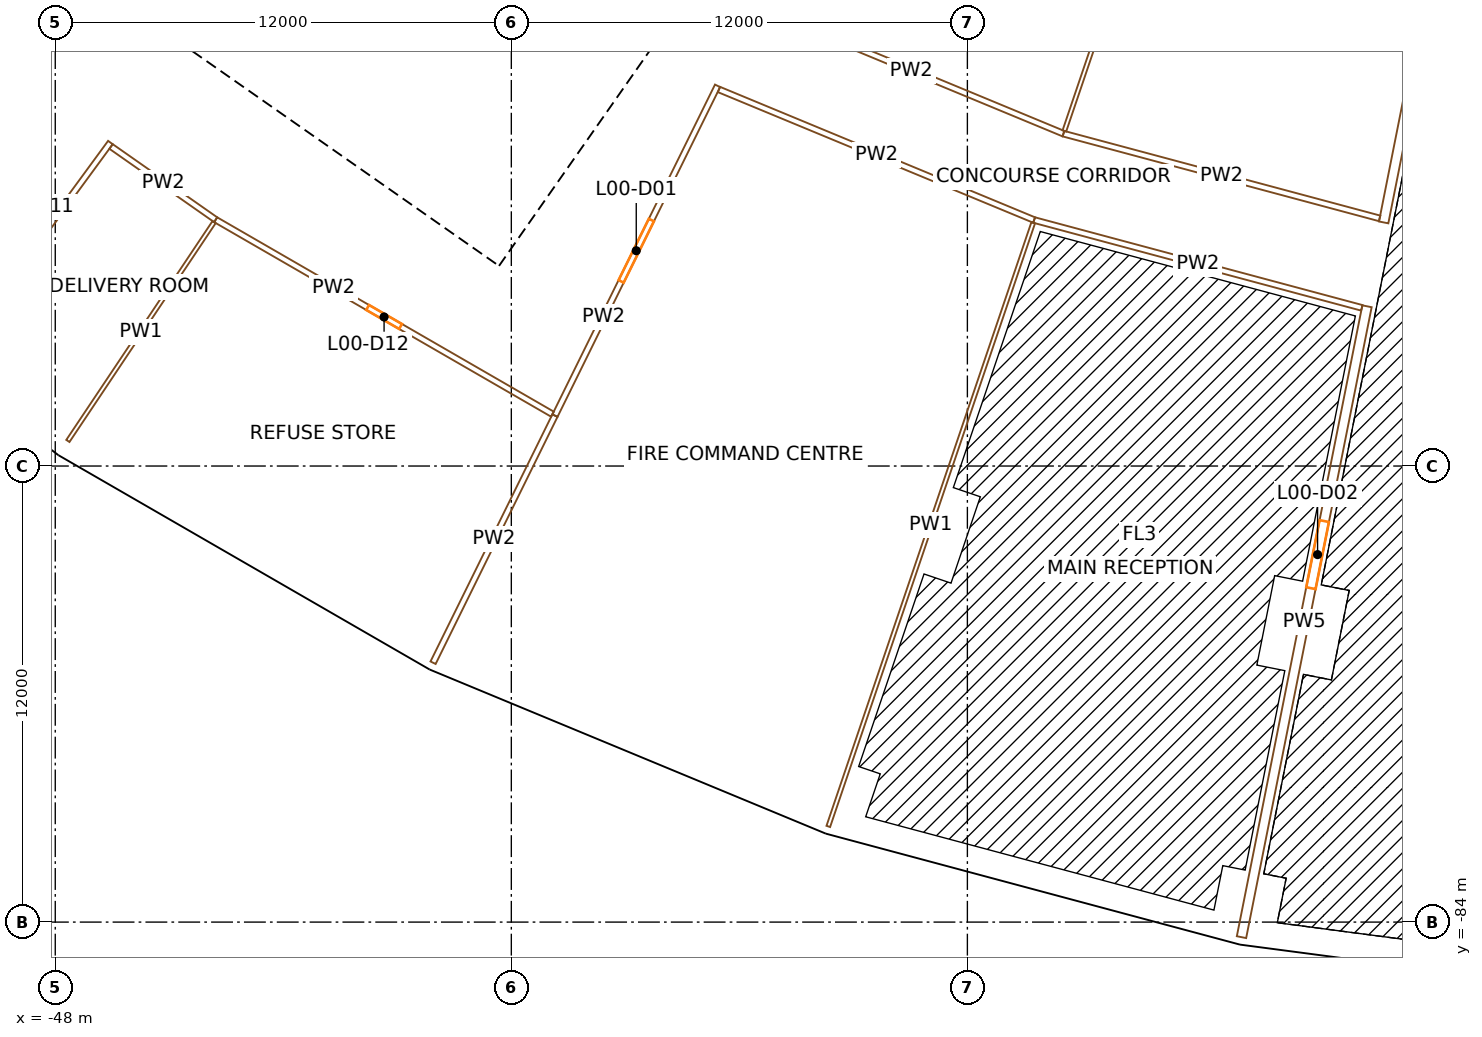
"""IFC4 building model, lengths in metres.
Left out: names, types, materials, properties, quantities, classifications, styles, units other than length and angle.
Written with IfcOpenShell. Run it as: python <this file> out.ifc"""

import sys

from ifc_helpers import new_model, si_unit, direction, frame, frame_2d, origin, origin_2d, place, context, subcontext, project, spatial, rectangle, extrude, element, fill, save


model = new_model("IFC4")
c1 = context("Model", 3, precision=1e-05, world=origin(), true_north=direction((0.0, 1.0)))
c2 = subcontext(c1, "Body", "Model", "MODEL_VIEW")
j1 = project(units=[si_unit("LENGTHUNIT", "METRE"), si_unit("PLANEANGLEUNIT", "RADIAN")], contexts=[c1])
p1 = place(None, origin())
s1 = spatial("IfcSite", under=j1, at=p1, CompositionType="ELEMENT")
p2 = place(p1, origin())
s2 = spatial("IfcBuilding", under=s1, at=p2, CompositionType="ELEMENT")
p3 = place(p2, origin())
s3 = spatial("IfcBuildingStorey", under=s2, at=p3, CompositionType="ELEMENT", Elevation=0.0)
p4 = place(p3, frame((-43.196, -64.647, -0.4), z_axis=(0.0, 0.0, 1.0), x_axis=(0.831469612303, -0.55557023302, 0.0)))
e1 = element("IfcColumn", 1, at=p4, inside=s3, PredefinedType="COLUMN", context=c2, shape_type="SweptSolid", body=[
    extrude(rectangle(XDim=1.4, YDim=1.8, at=origin_2d()), origin(), (0.0, 0.0, 1.0), 9.4),
])
p5 = place(p3, frame((-47.362, -70.883, -0.4), z_axis=(0.0, 0.0, 1.0), x_axis=(0.831469612303, -0.55557023302, 0.0)))
e2 = element("IfcColumn", 2, at=p5, inside=s3, PredefinedType="COLUMN", context=c2, shape_type="SweptSolid", body=[
    extrude(rectangle(XDim=1.1, YDim=1.3, at=origin_2d()), origin(), (0.0, 0.0, 1.0), 9.4),
])
p6 = place(p3, frame((-34.388, -69.732, -0.4), z_axis=(0.0, 0.0, 1.0), x_axis=(0.896872741533, -0.442288690219, 0.0)))
e3 = element("IfcColumn", 3, at=p6, inside=s3, PredefinedType="COLUMN", context=c2, shape_type="SweptSolid", body=[
    extrude(rectangle(XDim=1.4, YDim=1.8, at=origin_2d()), origin(), (0.0, 0.0, 1.0), 9.4),
])
p7 = place(p3, frame((-37.705, -76.458, -0.4), z_axis=(0.0, 0.0, 1.0), x_axis=(0.896872741533, -0.442288690219, 0.0)))
e4 = element("IfcColumn", 4, at=p7, inside=s3, PredefinedType="COLUMN", context=c2, shape_type="SweptSolid", body=[
    extrude(rectangle(XDim=1.1, YDim=1.3, at=origin_2d()), origin(), (0.0, 0.0, 1.0), 9.4),
])
p8 = place(p3, frame((-24.992, -73.624, -0.4), z_axis=(0.0, 0.0, 1.0), x_axis=(0.946930129495, -0.321439465303, 0.0)))
e5 = element("IfcColumn", 5, at=p8, inside=s3, PredefinedType="COLUMN", context=c2, shape_type="SweptSolid", body=[
    extrude(rectangle(XDim=1.4, YDim=1.8, at=origin_2d()), origin(), (0.0, 0.0, 1.0), 9.4),
])
p9 = place(p3, frame((-27.403, -80.726, -0.4), z_axis=(0.0, 0.0, 1.0), x_axis=(0.946930129495, -0.321439465303, 0.0)))
e6 = element("IfcColumn", 6, at=p9, inside=s3, PredefinedType="COLUMN", context=c2, shape_type="SweptSolid", body=[
    extrude(rectangle(XDim=1.1, YDim=1.3, at=origin_2d()), origin(), (0.0, 0.0, 1.0), 9.4),
])
p10 = place(p3, frame((-15.168, -76.256, -0.4), z_axis=(0.0, 0.0, 1.0), x_axis=(0.980785280403, -0.195090322016, 0.0)))
e7 = element("IfcColumn", 7, at=p10, inside=s3, PredefinedType="COLUMN", context=c2, shape_type="SweptSolid", body=[
    extrude(rectangle(XDim=1.4, YDim=1.8, at=origin_2d()), origin(), (0.0, 0.0, 1.0), 9.4),
])
p11 = place(p3, frame((-16.631, -83.612, -0.4), z_axis=(0.0, 0.0, 1.0), x_axis=(0.980785280403, -0.195090322016, 0.0)))
e8 = element("IfcColumn", 8, at=p11, inside=s3, PredefinedType="COLUMN", context=c2, shape_type="SweptSolid", body=[
    extrude(rectangle(XDim=1.1, YDim=1.3, at=origin_2d()), origin(), (0.0, 0.0, 1.0), 9.4),
])
p12 = place(p3, frame((-36.717, -66.337, 0.0), z_axis=(0.0, 0.0, 1.0), x_axis=(0.573577477574, 0.819151315216, 0.0)))
e9 = element("IfcWall", 9, at=p12, inside=s3, PredefinedType="SHEAR", context=c2, shape_type="SweptSolid", body=[
    extrude(rectangle(XDim=14.8, YDim=0.9, at=frame_2d((7.4, 0.0))), origin(), (0.0, 0.0, 1.0), 8.6),
])
p13 = place(p12, frame((6.2, 0.0, 0.0)))
e10 = element("IfcOpeningElement", 10, at=p13, cuts=e9, PredefinedType="OPENING", context=c2, shape_type="SweptSolid", body=[
    extrude(rectangle(XDim=2.4, YDim=2.1, at=frame_2d((1.2, 1.05))), frame((0.0, 0.46, 0.0), z_axis=(0.0, -1.0, 0.0), x_axis=(1.0, 0.0, 0.0)), (0.0, 0.0, 1.0), 0.92),
])
p14 = place(p3, frame((-36.827, -65.71, 0.0), z_axis=(0.0, 0.0, 1.0), x_axis=(-0.819153391756, 0.573574511963, 0.0)))
e11 = element("IfcWall", 11, at=p14, inside=s3, PredefinedType="SHEAR", context=c2, shape_type="SweptSolid", body=[
    extrude(rectangle(XDim=15.045, YDim=0.9, at=frame_2d((7.523, 0.0))), origin(), (0.0, 0.0, 1.0), 8.6),
])
p15 = place(p14, frame((0.8, 0.0, 0.0)))
e12 = element("IfcOpeningElement", 12, at=p15, cuts=e11, PredefinedType="OPENING", context=c2, shape_type="SweptSolid", body=[
    extrude(rectangle(XDim=1.0, YDim=2.1, at=frame_2d((0.5, 1.05))), frame((0.0, 0.46, 0.0), z_axis=(0.0, -1.0, 0.0), x_axis=(1.0, 0.0, 0.0)), (0.0, 0.0, 1.0), 0.92),
])
p16 = place(p14, frame((3.475, 0.0, 0.0)))
e13 = element("IfcOpeningElement", 13, at=p16, cuts=e11, PredefinedType="OPENING", context=c2, shape_type="SweptSolid", body=[
    extrude(rectangle(XDim=1.0, YDim=2.1, at=frame_2d((0.5, 1.05))), frame((0.0, 0.46, 0.0), z_axis=(0.0, -1.0, 0.0), x_axis=(1.0, 0.0, 0.0)), (0.0, 0.0, 1.0), 0.92),
])
p17 = place(p14, frame((6.175, 0.0, 0.0)))
e14 = element("IfcOpeningElement", 14, at=p17, cuts=e11, PredefinedType="OPENING", context=c2, shape_type="SweptSolid", body=[
    extrude(rectangle(XDim=1.0, YDim=2.1, at=frame_2d((0.5, 1.05))), frame((0.0, 0.46, 0.0), z_axis=(0.0, -1.0, 0.0), x_axis=(1.0, 0.0, 0.0)), (0.0, 0.0, 1.0), 0.92),
])
p18 = place(p14, frame((13.495, 0.0, 0.0)))
e15 = element("IfcOpeningElement", 15, at=p18, cuts=e11, PredefinedType="OPENING", context=c2, shape_type="SweptSolid", body=[
    extrude(rectangle(XDim=1.1, YDim=2.1, at=frame_2d((0.55, 1.05))), frame((0.0, 0.46, 0.0), z_axis=(0.0, -1.0, 0.0), x_axis=(1.0, 0.0, 0.0)), (0.0, 0.0, 1.0), 0.92),
])
p19 = place(p3, frame((-33.787, -61.369, 0.0), z_axis=(0.0, 0.0, 1.0), x_axis=(-0.819152564888, 0.573575692858, 0.0)))
e16 = element("IfcWall", 16, at=p19, inside=s3, PredefinedType="SOLIDWALL", context=c2, shape_type="SweptSolid", body=[
    extrude(rectangle(XDim=7.95, YDim=0.3, at=frame_2d((3.975, 0.0))), origin(), (0.0, 0.0, 1.0), 8.6),
])
p20 = place(p19, frame((0.962, 0.0, 0.0)))
e17 = element("IfcOpeningElement", 17, at=p20, cuts=e16, PredefinedType="OPENING", context=c2, shape_type="SweptSolid", body=[
    extrude(rectangle(XDim=1.0, YDim=2.1, at=frame_2d((0.5, 1.05))), frame((0.0, 0.16, 0.0), z_axis=(0.0, -1.0, 0.0), x_axis=(1.0, 0.0, 0.0)), (0.0, 0.0, 1.0), 0.32),
])
p21 = place(p19, frame((3.775, 0.0, 0.0)))
e18 = element("IfcOpeningElement", 18, at=p21, cuts=e16, PredefinedType="OPENING", context=c2, shape_type="SweptSolid", body=[
    extrude(rectangle(XDim=1.0, YDim=2.1, at=frame_2d((0.5, 1.05))), frame((0.0, 0.16, 0.0), z_axis=(0.0, -1.0, 0.0), x_axis=(1.0, 0.0, 0.0)), (0.0, 0.0, 1.0), 0.32),
])
p22 = place(p19, frame((6.288, 0.0, 0.0)))
e19 = element("IfcOpeningElement", 19, at=p22, cuts=e16, PredefinedType="OPENING", context=c2, shape_type="SweptSolid", body=[
    extrude(rectangle(XDim=1.0, YDim=2.1, at=frame_2d((0.5, 1.05))), frame((0.0, 0.16, 0.0), z_axis=(0.0, -1.0, 0.0), x_axis=(1.0, 0.0, 0.0)), (0.0, 0.0, 1.0), 0.32),
])
p23 = place(p3, frame((-35.221, -63.417, 0.0), z_axis=(0.0, 0.0, 1.0), x_axis=(-0.819166993208, 0.573555086491, 0.0)))
e20 = element("IfcWall", 20, at=p23, inside=s3, PredefinedType="SOLIDWALL", context=c2, shape_type="SweptSolid", body=[
    extrude(rectangle(XDim=7.95, YDim=0.3, at=frame_2d((3.975, 0.0))), origin(), (0.0, 0.0, 1.0), 8.6),
])
p24 = place(p3, frame((-36.331, -59.771, 0.0), z_axis=(0.0, 0.0, 1.0), x_axis=(-0.573633636671, -0.819111989218, 0.0)))
e21 = element("IfcWall", 21, at=p24, inside=s3, PredefinedType="PARTITIONING", context=c2, shape_type="SweptSolid", body=[
    extrude(rectangle(XDim=2.2, YDim=0.15, at=frame_2d((1.1, 0.0))), origin(), (0.0, 0.0, 1.0), 8.6),
])
p25 = place(p3, frame((-37.478, -62.02, 0.0), z_axis=(0.0, 0.0, 1.0), x_axis=(-0.573581496053, -0.819148501424, 0.0)))
e22 = element("IfcWall", 22, at=p25, inside=s3, PredefinedType="PLUMBINGWALL", context=c2, shape_type="SweptSolid", body=[
    extrude(rectangle(XDim=2.2, YDim=0.1, at=frame_2d((1.1, 0.0))), origin(), (0.0, 0.0, 1.0), 8.6),
])
p26 = place(p3, frame((-39.649, -60.5, 0.0), z_axis=(0.0, 0.0, 1.0), x_axis=(-0.573507030513, -0.819200638399, 0.0)))
e23 = element("IfcWall", 23, at=p26, inside=s3, PredefinedType="PLUMBINGWALL", context=c2, shape_type="SweptSolid", body=[
    extrude(rectangle(XDim=2.2, YDim=0.1, at=frame_2d((1.1, 0.0))), origin(), (0.0, 0.0, 1.0), 8.6),
])
p27 = place(p3, frame((-56.673, -64.713, 0.0), z_axis=(0.0, 0.0, 1.0), x_axis=(0.793355377778, -0.608758773695, 0.0)))
e24 = element("IfcWall", 24, at=p27, inside=s3, PredefinedType="SOLIDWALL", context=c2, shape_type="SweptSolid", body=[
    extrude(rectangle(XDim=11.135, YDim=0.45, at=frame_2d((5.567, 0.0))), origin(), (0.0, 0.0, 1.0), 7.7),
])
p28 = place(p27, frame((3.396, 0.0, 0.0), z_axis=(0.0, 0.0, 1.0), x_axis=(-1.0, 0.0, 0.0)))
e25 = element("IfcOpeningElement", 25, at=p28, cuts=e24, PredefinedType="OPENING", context=c2, shape_type="SweptSolid", body=[
    extrude(rectangle(XDim=1.2, YDim=2.4, at=frame_2d((0.6, 1.2))), frame((0.0, 0.235, 0.0), z_axis=(0.0, -1.0, 0.0), x_axis=(1.0, 0.0, 0.0)), (0.0, 0.0, 1.0), 0.47),
])
p29 = place(p3, frame((-47.819, -71.512, 0.0), z_axis=(0.0, 0.0, 1.0), x_axis=(0.866022921069, -0.500004300164, 0.0)))
e26 = element("IfcWall", 26, at=p29, inside=s3, PredefinedType="SOLIDWALL", context=c2, shape_type="SweptSolid", body=[
    extrude(rectangle(XDim=11.297, YDim=0.45, at=frame_2d((5.649, 0.0))), origin(), (0.0, 0.0, 1.0), 7.7),
])
p30 = place(p29, frame((4.756, 0.0, 0.0)))
e27 = element("IfcOpeningElement", 27, at=p30, cuts=e26, PredefinedType="OPENING", context=c2, shape_type="SweptSolid", body=[
    extrude(rectangle(XDim=1.8, YDim=2.4, at=frame_2d((0.9, 1.2))), frame((0.0, 0.235, 0.0), z_axis=(0.0, -1.0, 0.0), x_axis=(1.0, 0.0, 0.0)), (0.0, 0.0, 1.0), 0.47),
])
p31 = place(p3, frame((-13.078, -84.935, 0.0), z_axis=(0.0, 0.0, 1.0), x_axis=(0.99144147491, -0.130551912392, 0.0)))
e28 = element("IfcWall", 28, at=p31, inside=s3, PredefinedType="SOLIDWALL", context=c2, shape_type="SweptSolid", body=[
    extrude(rectangle(XDim=3.761, YDim=0.3, at=frame_2d((1.88, 0.0))), origin(), (0.0, 0.0, 1.0), 7.7),
])
p32 = place(p31, frame((0.68, 0.0, 0.0)))
e29 = element("IfcOpeningElement", 29, at=p32, cuts=e28, PredefinedType="OPENING", context=c2, shape_type="SweptSolid", body=[
    extrude(rectangle(XDim=2.4, YDim=3.0, at=frame_2d((1.2, 1.5))), frame((0.0, 0.16, 0.0), z_axis=(0.0, -1.0, 0.0), x_axis=(1.0, 0.0, 0.0)), (0.0, 0.0, 1.0), 0.32),
])
p33 = place(p3, frame((-46.549, -63.489, 0.0), z_axis=(0.0, 0.0, 1.0), x_axis=(-0.591288618584, -0.806460023518, 0.0)))
e30 = element("IfcWall", 30, at=p33, inside=s3, PredefinedType="PARTITIONING", context=c2, shape_type="SweptSolid", body=[
    extrude(rectangle(XDim=6.911, YDim=0.15, at=frame_2d((3.456, 0.0))), origin(), (0.0, 0.0, 1.0), 7.6),
])
p34 = place(p33, frame((3.005, 0.0, 0.0)))
e31 = element("IfcOpeningElement", 31, at=p34, cuts=e30, PredefinedType="OPENING", context=c2, shape_type="SweptSolid", body=[
    extrude(rectangle(XDim=0.9, YDim=2.1, at=frame_2d((0.45, 1.05))), frame((0.0, 0.085, 0.0), z_axis=(0.0, -1.0, 0.0), x_axis=(1.0, 0.0, 0.0)), (0.0, 0.0, 1.0), 0.17),
])
p35 = place(p3, frame((-47.668, -71.34, 0.0), z_axis=(0.0, 0.0, 1.0), x_axis=(0.55558668503, 0.831458619185, 0.0)))
e32 = element("IfcWall", 32, at=p35, inside=s3, PredefinedType="PARTITIONING", context=c2, shape_type="SweptSolid", body=[
    extrude(rectangle(XDim=6.925, YDim=0.1, at=frame_2d((3.462, 0.0))), origin(), (0.0, 0.0, 1.0), 7.6),
])
p36 = place(p3, frame((-46.532, -63.592, 0.0), z_axis=(0.0, 0.0, 1.0), x_axis=(0.819136350291, -0.573598849051, 0.0)))
e33 = element("IfcWall", 33, at=p36, inside=s3, PredefinedType="PARTITIONING", context=c2, shape_type="SweptSolid", body=[
    extrude(rectangle(XDim=3.361, YDim=0.15, at=frame_2d((1.68, 0.0))), origin(), (0.0, 0.0, 1.0), 7.6),
])
p37 = place(p3, frame((-34.917, -70.636, 0.0), z_axis=(0.0, 0.0, 1.0), x_axis=(-0.866032223049, 0.499988188501, 0.0)))
e34 = element("IfcWall", 34, at=p37, inside=s3, PredefinedType="PARTITIONING", context=c2, shape_type="SweptSolid", body=[
    extrude(rectangle(XDim=10.233, YDim=0.15, at=frame_2d((5.116, 0.0))), origin(), (0.0, 0.0, 1.0), 7.6),
])
p38 = place(p37, frame((4.616, 0.0, 0.0)))
e35 = element("IfcOpeningElement", 35, at=p38, cuts=e34, PredefinedType="OPENING", context=c2, shape_type="SweptSolid", body=[
    extrude(rectangle(XDim=1.0, YDim=2.1, at=frame_2d((0.5, 1.05))), frame((0.0, 0.085, 0.0), z_axis=(0.0, -1.0, 0.0), x_axis=(1.0, 0.0, 0.0)), (0.0, 0.0, 1.0), 0.17),
])
p39 = place(p3, frame((-34.852, -70.674, 0.0), z_axis=(0.0, 0.0, 1.0), x_axis=(-0.442303616305, -0.896865380647, 0.0)))
e36 = element("IfcWall", 36, at=p39, inside=s3, PredefinedType="PARTITIONING", context=c2, shape_type="SweptSolid", body=[
    extrude(rectangle(XDim=7.25, YDim=0.15, at=frame_2d((3.625, 0.0))), origin(), (0.0, 0.0, 1.0), 7.6),
])
p40 = place(p3, frame((-30.573, -61.996, 0.0), z_axis=(0.0, 0.0, 1.0), x_axis=(-0.442281083907, -0.89687649251, 0.0)))
e37 = element("IfcWall", 37, at=p40, inside=s3, PredefinedType="PARTITIONING", context=c2, shape_type="SweptSolid", body=[
    extrude(rectangle(XDim=9.675, YDim=0.15, at=frame_2d((4.837, 0.0))), origin(), (0.0, 0.0, 1.0), 7.6),
])
p41 = place(p40, frame((3.938, 0.0, 0.0)))
e38 = element("IfcOpeningElement", 38, at=p41, cuts=e37, PredefinedType="OPENING", context=c2, shape_type="SweptSolid", body=[
    extrude(rectangle(XDim=1.8, YDim=2.1, at=frame_2d((0.9, 1.05))), frame((0.0, 0.085, 0.0), z_axis=(0.0, -1.0, 0.0), x_axis=(1.0, 0.0, 0.0)), (0.0, 0.0, 1.0), 0.17),
])
p42 = place(p3, frame((-30.537, -62.092, 0.0), z_axis=(0.0, 0.0, 1.0), x_axis=(0.923877943186, -0.382687269313, 0.0)))
e39 = element("IfcWall", 39, at=p42, inside=s3, PredefinedType="PARTITIONING", context=c2, shape_type="SweptSolid", body=[
    extrude(rectangle(XDim=8.977, YDim=0.15, at=frame_2d((4.488, 0.0))), origin(), (0.0, 0.0, 1.0), 7.6),
])
p43 = place(p3, frame((-29.476, -59.94, 0.0), z_axis=(0.0, 0.0, 1.0), x_axis=(0.923877031545, -0.382689470177, 0.0)))
e40 = element("IfcWall", 40, at=p43, inside=s3, PredefinedType="PARTITIONING", context=c2, shape_type="SweptSolid", body=[
    extrude(rectangle(XDim=8.663, YDim=0.15, at=frame_2d((4.332, 0.0))), origin(), (0.0, 0.0, 1.0), 7.6),
])
p44 = place(p3, frame((-27.66, -81.483, 0.0), z_axis=(0.0, 0.0, 1.0), x_axis=(0.321431987478, 0.946932667842, 0.0)))
e41 = element("IfcWall", 41, at=p44, inside=s3, PredefinedType="PARTITIONING", context=c2, shape_type="SweptSolid", body=[
    extrude(rectangle(XDim=16.774, YDim=0.1, at=frame_2d((8.387, 0.0))), origin(), (0.0, 0.0, 1.0), 7.6),
])
p45 = place(p3, frame((-22.244, -65.528, 0.0), z_axis=(0.0, 0.0, 1.0), x_axis=(0.965928763412, -0.258808083362, 0.0)))
e42 = element("IfcWall", 42, at=p45, inside=s3, PredefinedType="PARTITIONING", context=c2, shape_type="SweptSolid", body=[
    extrude(rectangle(XDim=8.927, YDim=0.15, at=frame_2d((4.463, 0.0))), origin(), (0.0, 0.0, 1.0), 7.6),
])
p46 = place(p3, frame((-21.472, -63.255, 0.0), z_axis=(0.0, 0.0, 1.0), x_axis=(0.96592325157, -0.258828653894, 0.0)))
e43 = element("IfcWall", 43, at=p46, inside=s3, PredefinedType="PARTITIONING", context=c2, shape_type="SweptSolid", body=[
    extrude(rectangle(XDim=8.613, YDim=0.15, at=frame_2d((4.306, 0.0))), origin(), (0.0, 0.0, 1.0), 7.6),
])
p47 = place(p3, frame((-16.136, -47.536, 0.0), z_axis=(0.0, 0.0, 1.0), x_axis=(-0.321439713462, -0.946930045256, 0.0)))
e44 = element("IfcWall", 44, at=p47, inside=s3, PredefinedType="PARTITIONING", context=c2, shape_type="SweptSolid", body=[
    extrude(rectangle(XDim=16.525, YDim=0.1, at=frame_2d((8.262, 0.0))), origin(), (0.0, 0.0, 1.0), 7.6),
])
p48 = place(p3, frame((-16.787, -84.396, 0.0), z_axis=(0.0, 0.0, 1.0), x_axis=(0.195086842272, 0.980785972561, 0.0)))
e45 = element("IfcWall", 45, at=p48, inside=s3, PredefinedType="PARTITIONING", context=c2, shape_type="SweptSolid", body=[
    extrude(rectangle(XDim=16.925, YDim=0.25, at=frame_2d((8.462, 0.0))), origin(), (0.0, 0.0, 1.0), 7.6),
])
p49 = place(p48, frame((9.362, 0.0, 0.0)))
e46 = element("IfcOpeningElement", 46, at=p49, cuts=e45, PredefinedType="OPENING", context=c2, shape_type="SweptSolid", body=[
    extrude(rectangle(XDim=1.8, YDim=2.1, at=frame_2d((0.9, 1.05))), frame((0.0, 0.135, 0.0), z_axis=(0.0, -1.0, 0.0), x_axis=(1.0, 0.0, 0.0)), (0.0, 0.0, 1.0), 0.27),
])
p50 = place(p3, frame((-13.047, -65.59, 0.0), z_axis=(0.0, 0.0, 1.0), x_axis=(0.195085176221, 0.980786303952, 0.0)))
e47 = element("IfcWall", 47, at=p50, inside=s3, PredefinedType="PARTITIONING", context=c2, shape_type="SweptSolid", body=[
    extrude(rectangle(XDim=17.125, YDim=0.25, at=frame_2d((8.562, 0.0))), origin(), (0.0, 0.0, 1.0), 7.6),
])
p51 = place(p50, frame((6.262, 0.0, 0.0)))
e48 = element("IfcOpeningElement", 48, at=p51, cuts=e47, PredefinedType="OPENING", context=c2, shape_type="SweptSolid", body=[
    extrude(rectangle(XDim=1.0, YDim=2.1, at=frame_2d((0.5, 1.05))), frame((0.0, 0.135, 0.0), z_axis=(0.0, -1.0, 0.0), x_axis=(1.0, 0.0, 0.0)), (0.0, 0.0, 1.0), 0.27),
])
p52 = place(p13, origin())
e49 = element("IfcDoor", 49, at=p52, inside=s3, OperationType="DOUBLE_DOOR_SINGLE_SWING", PredefinedType="DOOR", context=c2, shape_type="SweptSolid", body=[
    extrude(rectangle(XDim=2.4, YDim=2.1, at=frame_2d((1.2, 1.05))), frame((0.0, 0.025, 0.0), z_axis=(0.0, -1.0, 0.0), x_axis=(1.0, 0.0, 0.0)), (0.0, 0.0, 1.0), 0.05),
])
fill(e10, e49)
p53 = place(p15, origin())
e50 = element("IfcDoor", 50, at=p53, inside=s3, OperationType="SINGLE_SWING_RIGHT", PredefinedType="DOOR", context=c2, shape_type="SweptSolid", body=[
    extrude(rectangle(XDim=1.0, YDim=2.1, at=frame_2d((0.5, 1.05))), frame((0.0, 0.025, 0.0), z_axis=(0.0, -1.0, 0.0), x_axis=(1.0, 0.0, 0.0)), (0.0, 0.0, 1.0), 0.05),
])
fill(e12, e50)
p54 = place(p16, origin())
e51 = element("IfcDoor", 51, at=p54, inside=s3, OperationType="SINGLE_SWING_LEFT", PredefinedType="DOOR", context=c2, shape_type="SweptSolid", body=[
    extrude(rectangle(XDim=1.0, YDim=2.1, at=frame_2d((0.5, 1.05))), frame((0.0, 0.025, 0.0), z_axis=(0.0, -1.0, 0.0), x_axis=(1.0, 0.0, 0.0)), (0.0, 0.0, 1.0), 0.05),
])
fill(e13, e51)
p55 = place(p17, origin())
e52 = element("IfcDoor", 52, at=p55, inside=s3, OperationType="SINGLE_SWING_RIGHT", PredefinedType="DOOR", context=c2, shape_type="SweptSolid", body=[
    extrude(rectangle(XDim=1.0, YDim=2.1, at=frame_2d((0.5, 1.05))), frame((0.0, 0.025, 0.0), z_axis=(0.0, -1.0, 0.0), x_axis=(1.0, 0.0, 0.0)), (0.0, 0.0, 1.0), 0.05),
])
fill(e14, e52)
p56 = place(p30, origin())
e53 = element("IfcDoor", 53, at=p56, inside=s3, OperationType="DOUBLE_DOOR_DOUBLE_SWING", PredefinedType="DOOR", context=c2, shape_type="SweptSolid", body=[
    extrude(rectangle(XDim=1.8, YDim=2.4, at=frame_2d((0.9, 1.2))), frame((0.0, 0.025, 0.0), z_axis=(0.0, -1.0, 0.0), x_axis=(1.0, 0.0, 0.0)), (0.0, 0.0, 1.0), 0.05),
])
fill(e27, e53)
p57 = place(p41, origin())
e54 = element("IfcDoor", 54, at=p57, inside=s3, OperationType="DOUBLE_DOOR_SINGLE_SWING", PredefinedType="DOOR", context=c2, shape_type="SweptSolid", body=[
    extrude(rectangle(XDim=1.8, YDim=2.1, at=frame_2d((0.9, 1.05))), frame((0.0, 0.025, 0.0), z_axis=(0.0, -1.0, 0.0), x_axis=(1.0, 0.0, 0.0)), (0.0, 0.0, 1.0), 0.05),
])
fill(e38, e54)
p58 = place(p49, origin())
e55 = element("IfcDoor", 55, at=p58, inside=s3, OperationType="DOUBLE_DOOR_SINGLE_SWING", PredefinedType="DOOR", context=c2, shape_type="SweptSolid", body=[
    extrude(rectangle(XDim=1.8, YDim=2.1, at=frame_2d((0.9, 1.05))), frame((0.0, 0.025, 0.0), z_axis=(0.0, -1.0, 0.0), x_axis=(1.0, 0.0, 0.0)), (0.0, 0.0, 1.0), 0.05),
])
fill(e46, e55)
p59 = place(p38, origin())
e56 = element("IfcDoor", 56, at=p59, inside=s3, OperationType="SINGLE_SWING_RIGHT", PredefinedType="DOOR", context=c2, shape_type="SweptSolid", body=[
    extrude(rectangle(XDim=1.0, YDim=2.1, at=frame_2d((0.5, 1.05))), frame((0.0, 0.025, 0.0), z_axis=(0.0, -1.0, 0.0), x_axis=(1.0, 0.0, 0.0)), (0.0, 0.0, 1.0), 0.05),
])
fill(e35, e56)
save(model, sys.argv[1])
